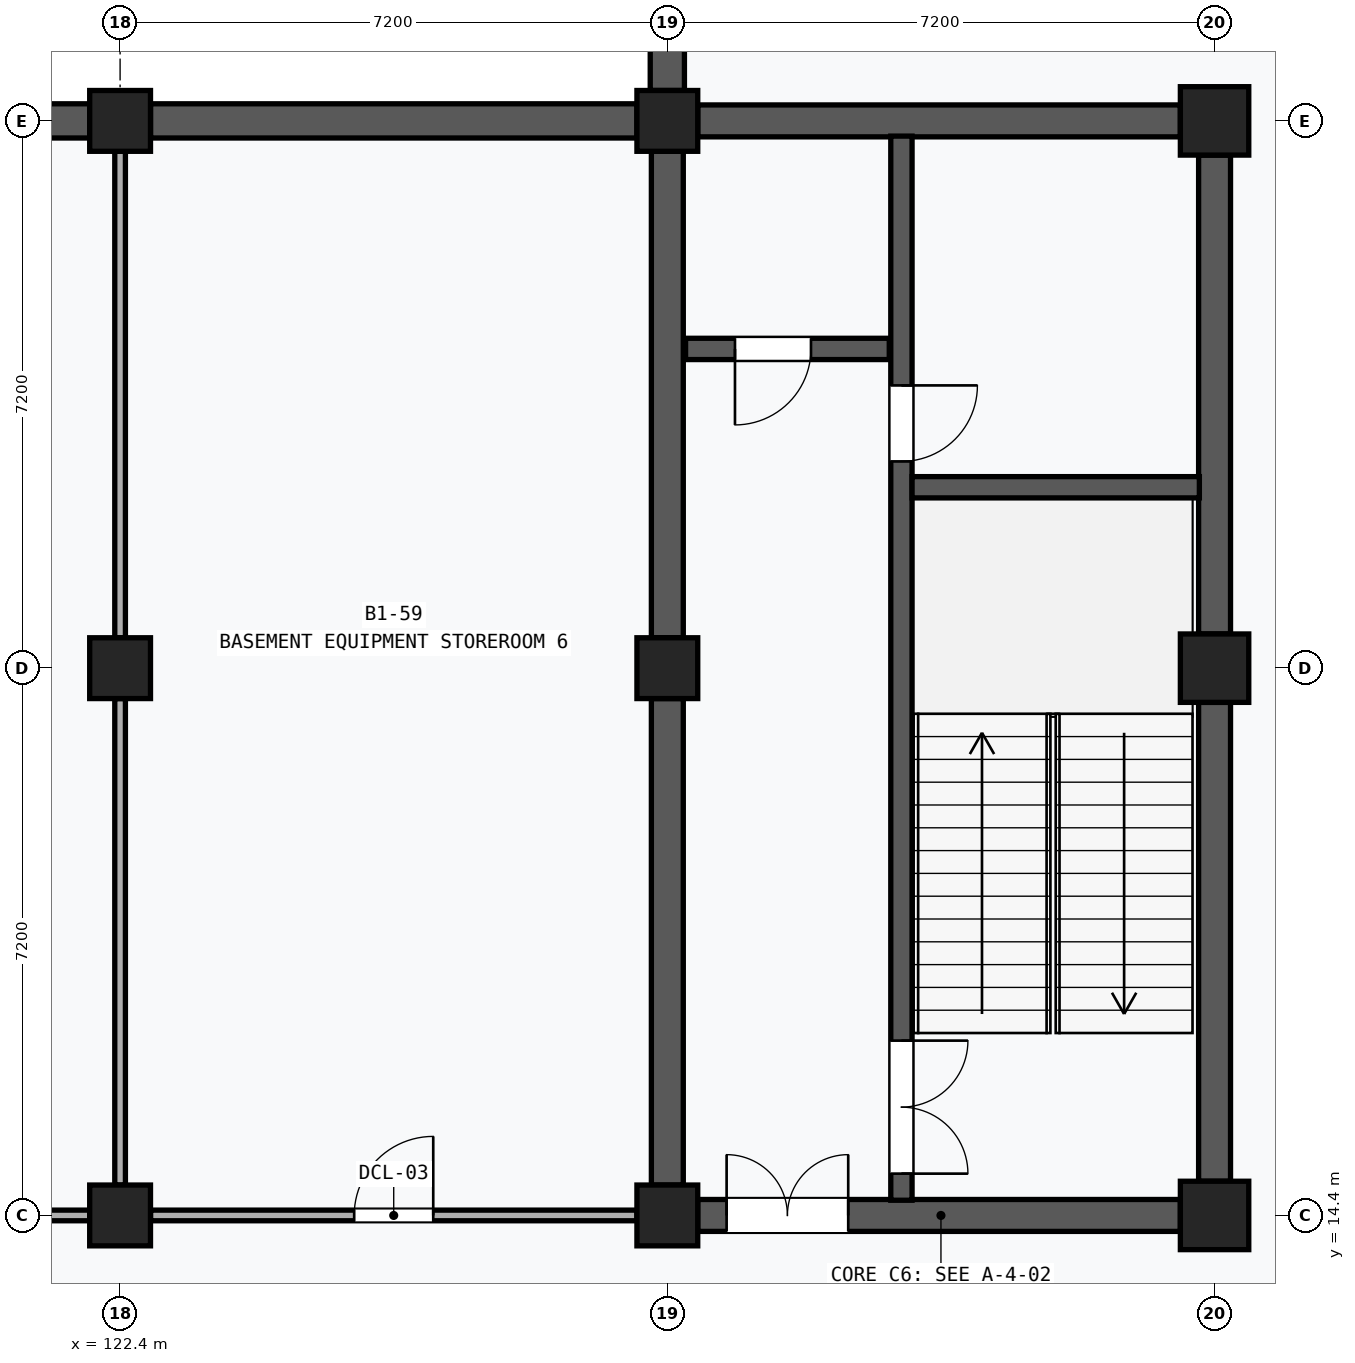
"""IFC4 building model, lengths in metres.
Left out: names, types, materials, properties, quantities, classifications, styles, units other than length and angle.
Written with IfcOpenShell. Run it as: python <this file> out.ifc"""

import sys

from ifc_helpers import new_model, si_unit, direction, frame, frame_2d, origin, origin_2d, place, context, subcontext, project, spatial, rectangle, extrude, element, fill, save


model = new_model("IFC4")
c1 = context("Model", 3, precision=1e-05, world=origin(), true_north=direction((0.0, 1.0)))
c2 = subcontext(c1, "Body", "Model", "MODEL_VIEW")
j1 = project(units=[si_unit("LENGTHUNIT", "METRE"), si_unit("PLANEANGLEUNIT", "RADIAN")], contexts=[c1])
p1 = place(None, origin())
s1 = spatial("IfcSite", under=j1, at=p1, CompositionType="ELEMENT")
p2 = place(p1, origin())
s2 = spatial("IfcBuilding", under=s1, at=p2, CompositionType="ELEMENT")
p3 = place(p2, frame((0.0, 0.0, -4.5)))
s3 = spatial("IfcBuildingStorey", under=s2, at=p3, CompositionType="ELEMENT", Elevation=-4.5)
for number, where, z_axis, x_axis in (
    (1, (122.4, 14.4, 0.0), (0.0, 0.0, 1.0), (1.0, 0.0, 0.0)),
    (2, (122.4, 21.6, 0.0), (0.0, 0.0, 1.0), (1.0, 0.0, 0.0)),
    (3, (122.4, 28.8, 0.0), (0.0, 0.0, 1.0), (1.0, 0.0, 0.0)),
    (4, (129.6, 14.4, 0.0), (0.0, 0.0, 1.0), (1.0, 0.0, 0.0)),
    (5, (129.6, 21.6, 0.0), (0.0, 0.0, 1.0), (1.0, 0.0, 0.0)),
    (6, (129.6, 28.8, 0.0), (0.0, 0.0, 1.0), (1.0, 0.0, 0.0)),
):
    element("IfcColumn", number, at=place(p3, frame(where, z_axis=z_axis, x_axis=x_axis)), inside=s3, PredefinedType="COLUMN", context=c2, shape_type="SweptSolid", body=[
        extrude(rectangle(XDim=0.8, YDim=0.8, at=origin_2d()), origin(), (0.0, 0.0, 1.0), 4.5),
    ])
for number, where, z_axis, x_axis in (
    (7, (136.8, 14.4, 0.0), (0.0, 0.0, 1.0), (1.0, 0.0, 0.0)),
    (8, (136.8, 21.6, 0.0), (0.0, 0.0, 1.0), (1.0, 0.0, 0.0)),
    (9, (136.8, 28.8, 0.0), (0.0, 0.0, 1.0), (1.0, 0.0, 0.0)),
):
    element("IfcColumn", number, at=place(p3, frame(where, z_axis=z_axis, x_axis=x_axis)), inside=s3, PredefinedType="COLUMN", context=c2, shape_type="SweptSolid", body=[
        extrude(rectangle(XDim=0.9, YDim=0.9, at=origin_2d()), origin(), (0.0, 0.0, 1.0), 4.5),
    ])
for number, where, z_axis, x_axis in (
    (10, (115.6, 28.8, 0.0), (0.0, 0.0, 1.0), (1.0, 0.0, 0.0)),
    (11, (122.8, 28.8, 0.0), (0.0, 0.0, 1.0), (1.0, 0.0, 0.0)),
):
    element("IfcWall", number, at=place(p3, frame(where, z_axis=z_axis, x_axis=x_axis)), inside=s3, PredefinedType="SOLIDWALL", context=c2, shape_type="SweptSolid", body=[
        extrude(rectangle(XDim=6.4, YDim=0.45, at=frame_2d((3.2, 0.0))), origin(), (0.0, 0.0, 1.0), 3.57),
    ])
p4 = place(p3, frame((129.6, 29.2, 0.0), z_axis=(0.0, 0.0, 1.0), x_axis=(0.0, 1.0, 0.0)))
e12 = element("IfcWall", 12, at=p4, inside=s3, PredefinedType="SOLIDWALL", context=c2, shape_type="SweptSolid", body=[
    extrude(rectangle(XDim=6.4, YDim=0.45, at=frame_2d((3.2, 0.0))), origin(), (0.0, 0.0, 1.0), 3.57),
])
for number, where, z_axis, x_axis in (
    (13, (129.6, 14.8, 0.0), (0.0, 0.0, 1.0), (0.0, 1.0, 0.0)),
    (14, (129.6, 22.0, 0.0), (0.0, 0.0, 1.0), (0.0, 1.0, 0.0)),
):
    element("IfcWall", number, at=place(p3, frame(where, z_axis=z_axis, x_axis=x_axis)), inside=s3, PredefinedType="SHEAR", context=c2, shape_type="SweptSolid", body=[
        extrude(rectangle(XDim=6.4, YDim=0.42, at=frame_2d((3.2, 0.0))), origin(), (0.0, 0.0, 1.0), 3.3),
    ])
p5 = place(p3, frame((136.8, 14.85, 0.0), z_axis=(0.0, 0.0, 1.0), x_axis=(0.0, 1.0, 0.0)))
e15 = element("IfcWall", 15, at=p5, inside=s3, PredefinedType="SHEAR", context=c2, shape_type="SweptSolid", body=[
    extrude(rectangle(XDim=6.3, YDim=0.42, at=frame_2d((3.15, 0.0))), origin(), (0.0, 0.0, 1.0), 3.3),
])
p6 = place(p3, frame((136.8, 22.05, 0.0), z_axis=(0.0, 0.0, 1.0), x_axis=(0.0, 1.0, 0.0)))
e16 = element("IfcWall", 16, at=p6, inside=s3, PredefinedType="SHEAR", context=c2, shape_type="SweptSolid", body=[
    extrude(rectangle(XDim=6.3, YDim=0.42, at=frame_2d((3.15, 0.0))), origin(), (0.0, 0.0, 1.0), 3.3),
])
p7 = place(p3, frame((130.0, 14.4, 0.0), z_axis=(0.0, 0.0, 1.0), x_axis=(1.0, 0.0, 0.0)))
e17 = element("IfcWall", 17, at=p7, inside=s3, PredefinedType="SHEAR", context=c2, shape_type="SweptSolid", body=[
    extrude(rectangle(XDim=6.35, YDim=0.42, at=frame_2d((3.175, 0.0))), origin(), (0.0, 0.0, 1.0), 3.3),
])
p8 = place(p7, frame((0.38, 0.0, 0.0)))
e18 = element("IfcOpeningElement", 18, at=p8, cuts=e17, PredefinedType="OPENING", context=c2, shape_type="SweptSolid", body=[
    extrude(rectangle(XDim=1.6, YDim=2.2, at=frame_2d((0.8, 1.1))), frame((0.0, 0.222, 0.0), z_axis=(0.0, -1.0, 0.0), x_axis=(1.0, 0.0, 0.0)), (0.0, 0.0, 1.0), 0.444),
])
p9 = place(p3, frame((130.0, 28.8, 0.0), z_axis=(0.0, 0.0, 1.0), x_axis=(1.0, 0.0, 0.0)))
e19 = element("IfcWall", 19, at=p9, inside=s3, PredefinedType="SHEAR", context=c2, shape_type="SweptSolid", body=[
    extrude(rectangle(XDim=6.35, YDim=0.42, at=frame_2d((3.175, 0.0))), origin(), (0.0, 0.0, 1.0), 3.3),
])
p10 = place(p3, frame((132.68, 14.6, 0.0), z_axis=(0.0, 0.0, 1.0), x_axis=(0.0, 1.0, 0.0)))
e20 = element("IfcWall", 20, at=p10, inside=s3, PredefinedType="SHEAR", context=c2, shape_type="SweptSolid", body=[
    extrude(rectangle(XDim=14.0, YDim=0.28, at=frame_2d((7.0, 0.0))), origin(), (0.0, 0.0, 1.0), 4.2),
])
p11 = place(p10, frame((0.35, 0.0, 0.0)))
e21 = element("IfcOpeningElement", 21, at=p11, cuts=e20, PredefinedType="OPENING", context=c2, shape_type="SweptSolid", body=[
    extrude(rectangle(XDim=1.75, YDim=2.15, at=frame_2d((0.875, 1.075))), frame((0.0, 0.152, 0.0), z_axis=(0.0, -1.0, 0.0), x_axis=(1.0, 0.0, 0.0)), (0.0, 0.0, 1.0), 0.304),
])
p12 = place(p10, frame((9.72, 0.0, 0.0)))
e22 = element("IfcOpeningElement", 22, at=p12, cuts=e20, PredefinedType="OPENING", context=c2, shape_type="SweptSolid", body=[
    extrude(rectangle(XDim=1.0, YDim=2.15, at=frame_2d((0.5, 1.075))), frame((0.0, 0.152, 0.0), z_axis=(0.0, -1.0, 0.0), x_axis=(1.0, 0.0, 0.0)), (0.0, 0.0, 1.0), 0.304),
])
p13 = place(p3, frame((132.82, 23.98, 0.0), z_axis=(0.0, 0.0, 1.0), x_axis=(1.0, 0.0, 0.0)))
e23 = element("IfcWall", 23, at=p13, inside=s3, PredefinedType="SHEAR", context=c2, shape_type="SweptSolid", body=[
    extrude(rectangle(XDim=3.78, YDim=0.28, at=frame_2d((1.89, 0.0))), origin(), (0.0, 0.0, 1.0), 4.2),
])
p14 = place(p3, frame((129.84, 25.8, 0.0), z_axis=(0.0, 0.0, 1.0), x_axis=(1.0, 0.0, 0.0)))
e24 = element("IfcWall", 24, at=p14, inside=s3, PredefinedType="SHEAR", context=c2, shape_type="SweptSolid", body=[
    extrude(rectangle(XDim=2.68, YDim=0.28, at=frame_2d((1.34, 0.0))), origin(), (0.0, 0.0, 1.0), 4.2),
])
p15 = place(p14, frame((0.65, 0.0, 0.0)))
e25 = element("IfcOpeningElement", 25, at=p15, cuts=e24, PredefinedType="OPENING", context=c2, shape_type="SweptSolid", body=[
    extrude(rectangle(XDim=1.0, YDim=2.15, at=frame_2d((0.5, 1.075))), frame((0.0, 0.152, 0.0), z_axis=(0.0, -1.0, 0.0), x_axis=(1.0, 0.0, 0.0)), (0.0, 0.0, 1.0), 0.304),
])
p16 = place(p3, frame((115.6, 14.4, 0.0), z_axis=(0.0, 0.0, 1.0), x_axis=(1.0, 0.0, 0.0)))
e26 = element("IfcWall", 26, at=p16, inside=s3, PredefinedType="PARTITIONING", context=c2, shape_type="SweptSolid", body=[
    extrude(rectangle(XDim=6.4, YDim=0.14, at=frame_2d((3.2, 0.0))), origin(), (0.0, 0.0, 1.0), 3.3),
])
p17 = place(p16, frame((2.69, 0.0, 0.0)))
e27 = element("IfcOpeningElement", 27, at=p17, cuts=e26, PredefinedType="OPENING", context=c2, shape_type="SweptSolid", body=[
    extrude(rectangle(XDim=1.02, YDim=2.12, at=frame_2d((0.51, 1.06))), frame((0.0, 0.082, 0.0), z_axis=(0.0, -1.0, 0.0), x_axis=(1.0, 0.0, 0.0)), (0.0, 0.0, 1.0), 0.164),
])
for number, where, z_axis, x_axis in (
    (28, (122.4, 14.8, 0.0), (0.0, 0.0, 1.0), (0.0, 1.0, 0.0)),
    (29, (122.4, 22.0, 0.0), (0.0, 0.0, 1.0), (0.0, 1.0, 0.0)),
):
    element("IfcWall", number, at=place(p3, frame(where, z_axis=z_axis, x_axis=x_axis)), inside=s3, PredefinedType="PARTITIONING", context=c2, shape_type="SweptSolid", body=[
        extrude(rectangle(XDim=6.4, YDim=0.14, at=frame_2d((3.2, 0.0))), origin(), (0.0, 0.0, 1.0), 3.3),
    ])
p18 = place(p3, frame((122.8, 14.4, 0.0), z_axis=(0.0, 0.0, 1.0), x_axis=(1.0, 0.0, 0.0)))
e30 = element("IfcWall", 30, at=p18, inside=s3, PredefinedType="PARTITIONING", context=c2, shape_type="SweptSolid", body=[
    extrude(rectangle(XDim=6.4, YDim=0.14, at=frame_2d((3.2, 0.0))), origin(), (0.0, 0.0, 1.0), 3.3),
])
p19 = place(p18, frame((2.68, 0.0, 0.0)))
e31 = element("IfcOpeningElement", 31, at=p19, cuts=e30, PredefinedType="OPENING", context=c2, shape_type="SweptSolid", body=[
    extrude(rectangle(XDim=1.04, YDim=2.14, at=frame_2d((0.52, 1.07))), frame((0.0, 0.082, 0.0), z_axis=(0.0, -1.0, 0.0), x_axis=(1.0, 0.0, 0.0)), (0.0, 0.0, 1.0), 0.164),
])
p20 = place(p8, origin())
e32 = element("IfcDoor", 32, at=p20, inside=s3, OperationType="DOUBLE_DOOR_SINGLE_SWING", PredefinedType="DOOR", context=c2, shape_type="SweptSolid", body=[
    extrude(rectangle(XDim=1.6, YDim=2.2, at=frame_2d((0.8, 1.1))), frame((0.0, 0.025, 0.0), z_axis=(0.0, -1.0, 0.0), x_axis=(1.0, 0.0, 0.0)), (0.0, 0.0, 1.0), 0.05),
])
fill(e18, e32)
p21 = place(p11, frame((1.75, 0.0, 0.0), z_axis=(0.0, 0.0, 1.0), x_axis=(-1.0, 0.0, 0.0)))
e33 = element("IfcDoor", 33, at=p21, inside=s3, OperationType="DOUBLE_DOOR_SINGLE_SWING", PredefinedType="DOOR", context=c2, shape_type="SweptSolid", body=[
    extrude(rectangle(XDim=1.75, YDim=2.15, at=frame_2d((0.875, 1.075))), frame((0.0, 0.025, 0.0), z_axis=(0.0, -1.0, 0.0), x_axis=(1.0, 0.0, 0.0)), (0.0, 0.0, 1.0), 0.05),
])
fill(e21, e33)
p22 = place(p12, frame((1.0, 0.0, 0.0), z_axis=(0.0, 0.0, 1.0), x_axis=(-1.0, 0.0, 0.0)))
e34 = element("IfcDoor", 34, at=p22, inside=s3, OperationType="SINGLE_SWING_LEFT", PredefinedType="DOOR", context=c2, shape_type="SweptSolid", body=[
    extrude(rectangle(XDim=1.0, YDim=2.15, at=frame_2d((0.5, 1.075))), frame((0.0, 0.025, 0.0), z_axis=(0.0, -1.0, 0.0), x_axis=(1.0, 0.0, 0.0)), (0.0, 0.0, 1.0), 0.05),
])
fill(e22, e34)
p23 = place(p15, frame((1.0, 0.0, 0.0), z_axis=(0.0, 0.0, 1.0), x_axis=(-1.0, 0.0, 0.0)))
e35 = element("IfcDoor", 35, at=p23, inside=s3, OperationType="SINGLE_SWING_RIGHT", PredefinedType="DOOR", context=c2, shape_type="SweptSolid", body=[
    extrude(rectangle(XDim=1.0, YDim=2.15, at=frame_2d((0.5, 1.075))), frame((0.0, 0.025, 0.0), z_axis=(0.0, -1.0, 0.0), x_axis=(1.0, 0.0, 0.0)), (0.0, 0.0, 1.0), 0.05),
])
fill(e25, e35)
p24 = place(p19, origin())
e36 = element("IfcDoor", 36, at=p24, inside=s3, OperationType="SINGLE_SWING_RIGHT", PredefinedType="DOOR", context=c2, shape_type="SweptSolid", body=[
    extrude(rectangle(XDim=1.04, YDim=2.14, at=frame_2d((0.52, 1.07))), frame((0.0, 0.025, 0.0), z_axis=(0.0, -1.0, 0.0), x_axis=(1.0, 0.0, 0.0)), (0.0, 0.0, 1.0), 0.05),
])
fill(e31, e36)
save(model, sys.argv[1])
